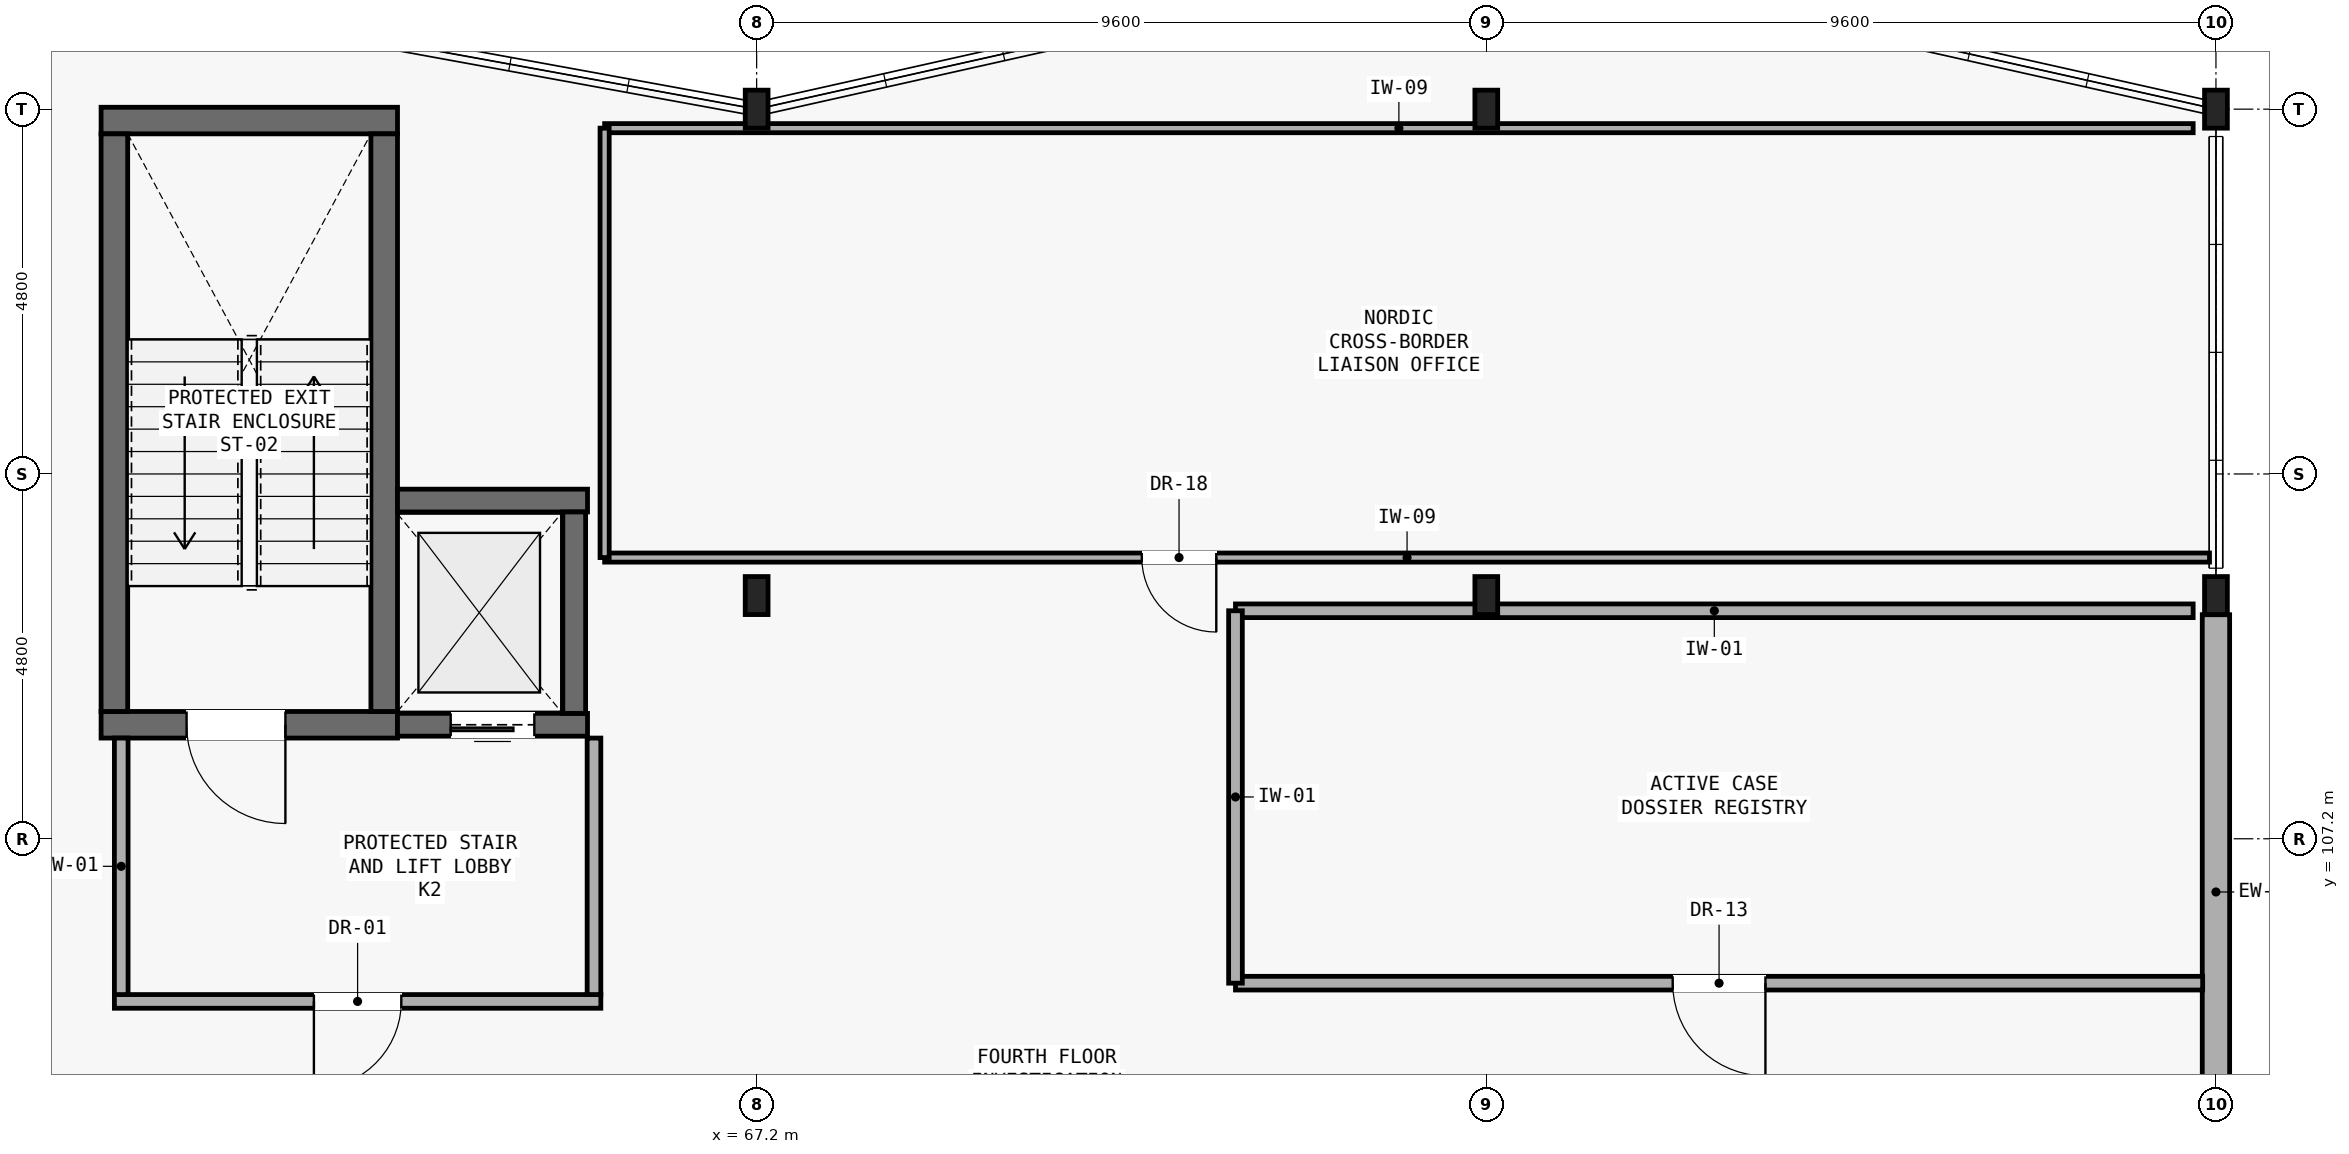
"""IFC4 building model, lengths in metres.
Left out: names, types, materials, properties, quantities, classifications, styles, units other than length and angle.
Written with IfcOpenShell. Run it as: python <this file> out.ifc"""

import sys

from ifc_helpers import new_model, si_unit, direction, frame, frame_2d, origin, origin_2d, place, context, subcontext, project, spatial, rectangle, i_section, extrude, element, fill, save


model = new_model("IFC4")
c1 = context("Model", 3, precision=1e-05, world=origin(), true_north=direction((0.0, 1.0)))
c2 = subcontext(c1, "Body", "Model", "MODEL_VIEW")
j1 = project(units=[si_unit("LENGTHUNIT", "METRE"), si_unit("PLANEANGLEUNIT", "RADIAN")], contexts=[c1])
p1 = place(None, origin())
s1 = spatial("IfcSite", under=j1, at=p1, CompositionType="ELEMENT")
p2 = place(p1, origin())
s2 = spatial("IfcBuilding", under=s1, at=p2, CompositionType="ELEMENT")
p3 = place(p2, frame((0.0, 0.0, 17.85)))
s3 = spatial("IfcBuildingStorey", under=s2, at=p3, CompositionType="ELEMENT", Elevation=17.85)
for number, where, z_axis, x_axis in (
    (1, (67.2, 110.4, 0.0), (0.0, 0.0, 1.0), (1.0, 0.0, 0.0)),
    (2, (67.2, 116.8, 0.0), (0.0, 0.0, 1.0), (1.0, 0.0, 0.0)),
    (3, (76.8, 110.4, 0.0), (0.0, 0.0, 1.0), (1.0, 0.0, 0.0)),
    (4, (76.8, 116.8, 0.0), (0.0, 0.0, 1.0), (1.0, 0.0, 0.0)),
    (5, (86.4, 110.4, 0.0), (0.0, 0.0, 1.0), (1.0, 0.0, 0.0)),
    (6, (86.4, 116.8, 0.0), (0.0, 0.0, 1.0), (1.0, 0.0, 0.0)),
):
    element("IfcColumn", number, at=place(p3, frame(where, z_axis=z_axis, x_axis=x_axis)), inside=s3, PredefinedType="COLUMN", context=c2, shape_type="SweptSolid", body=[
        extrude(i_section(OverallWidth=0.3, OverallDepth=0.5, WebThickness=0.014, FlangeThickness=0.028, FilletRadius=0.027, at=origin_2d()), origin(), (0.0, 0.0, 1.0), 4.2),
    ])
p4 = place(p3, frame((86.4, 102.852, 0.0), z_axis=(0.0, 0.0, 1.0), x_axis=(0.0, 1.0, 0.0)))
e7 = element("IfcWall", 7, at=p4, inside=s3, PredefinedType="SOLIDWALL", context=c2, shape_type="SweptSolid", body=[
    extrude(rectangle(XDim=7.296, YDim=0.36, at=frame_2d((3.648, 0.0))), origin(), (0.0, 0.0, 1.0), 3.53),
])
p5 = place(p3, frame((58.575, 108.7, 0.0), z_axis=(0.0, 0.0, 1.0), x_axis=(1.0, 0.0, 0.0)))
e8 = element("IfcWall", 8, at=p5, inside=s3, PredefinedType="SHEAR", context=c2, shape_type="SweptSolid", body=[
    extrude(rectangle(XDim=3.9, YDim=0.35, at=frame_2d((1.95, 0.0))), origin(), (0.0, 0.0, 1.0), 3.99),
])
p6 = place(p5, frame((1.125, 0.0, 0.0)))
e9 = element("IfcOpeningElement", 9, at=p6, cuts=e8, PredefinedType="OPENING", context=c2, shape_type="SweptSolid", body=[
    extrude(rectangle(XDim=1.3, YDim=2.15, at=frame_2d((0.65, 1.075))), frame((0.0, 0.185, 0.0), z_axis=(0.0, -1.0, 0.0), x_axis=(1.0, 0.0, 0.0)), (0.0, 0.0, 1.0), 0.37),
])
p7 = place(p3, frame((58.575, 116.65, 0.0), z_axis=(0.0, 0.0, 1.0), x_axis=(1.0, 0.0, 0.0)))
e10 = element("IfcWall", 10, at=p7, inside=s3, PredefinedType="SHEAR", context=c2, shape_type="SweptSolid", body=[
    extrude(rectangle(XDim=3.9, YDim=0.35, at=frame_2d((1.95, 0.0))), origin(), (0.0, 0.0, 1.0), 3.99),
])
for number, where, z_axis, x_axis in (
    (11, (58.75, 108.875, 0.0), (0.0, 0.0, 1.0), (0.0, 1.0, 0.0)),
    (12, (62.3, 108.875, 0.0), (0.0, 0.0, 1.0), (0.0, 1.0, 0.0)),
):
    element("IfcWall", number, at=place(p3, frame(where, z_axis=z_axis, x_axis=x_axis)), inside=s3, PredefinedType="SHEAR", context=c2, shape_type="SweptSolid", body=[
        extrude(rectangle(XDim=7.6, YDim=0.35, at=frame_2d((3.8, 0.0))), origin(), (0.0, 0.0, 1.0), 3.99),
    ])
p8 = place(p3, frame((62.475, 108.7, 0.0), z_axis=(0.0, 0.0, 1.0), x_axis=(1.0, 0.0, 0.0)))
e13 = element("IfcWall", 13, at=p8, inside=s3, PredefinedType="SHEAR", context=c2, shape_type="SweptSolid", body=[
    extrude(rectangle(XDim=2.5, YDim=0.3, at=frame_2d((1.25, 0.0))), origin(), (0.0, 0.0, 1.0), 3.99),
])
p9 = place(p8, frame((0.7, 0.0, 0.0)))
e14 = element("IfcOpeningElement", 14, at=p9, cuts=e13, PredefinedType="OPENING", context=c2, shape_type="SweptSolid", body=[
    extrude(rectangle(XDim=1.1, YDim=2.1, at=frame_2d((0.55, 1.05))), frame((0.0, 0.16, 0.0), z_axis=(0.0, -1.0, 0.0), x_axis=(1.0, 0.0, 0.0)), (0.0, 0.0, 1.0), 0.32),
])
p10 = place(p3, frame((62.475, 111.65, 0.0), z_axis=(0.0, 0.0, 1.0), x_axis=(1.0, 0.0, 0.0)))
e15 = element("IfcWall", 15, at=p10, inside=s3, PredefinedType="SHEAR", context=c2, shape_type="SweptSolid", body=[
    extrude(rectangle(XDim=2.5, YDim=0.3, at=frame_2d((1.25, 0.0))), origin(), (0.0, 0.0, 1.0), 3.99),
])
p11 = place(p3, frame((64.8, 108.85, 0.0), z_axis=(0.0, 0.0, 1.0), x_axis=(0.0, 1.0, 0.0)))
e16 = element("IfcWall", 16, at=p11, inside=s3, PredefinedType="SHEAR", context=c2, shape_type="SweptSolid", body=[
    extrude(rectangle(XDim=2.65, YDim=0.3, at=frame_2d((1.325, 0.0))), origin(), (0.0, 0.0, 1.0), 3.99),
])
p12 = place(p3, frame((58.75, 105.06, 0.0), z_axis=(0.0, 0.0, 1.0), x_axis=(1.0, 0.0, 0.0)))
e17 = element("IfcWall", 17, at=p12, inside=s3, PredefinedType="PARTITIONING", context=c2, shape_type="SweptSolid", body=[
    extrude(rectangle(XDim=6.4, YDim=0.18, at=frame_2d((3.2, 0.0))), origin(), (0.0, 0.0, 1.0), 3.61),
])
p13 = place(p12, frame((2.625, 0.0, 0.0)))
e18 = element("IfcOpeningElement", 18, at=p13, cuts=e17, PredefinedType="OPENING", context=c2, shape_type="SweptSolid", body=[
    extrude(rectangle(XDim=1.15, YDim=2.15, at=frame_2d((0.575, 1.075))), frame((0.0, 0.1, 0.0), z_axis=(0.0, -1.0, 0.0), x_axis=(1.0, 0.0, 0.0)), (0.0, 0.0, 1.0), 0.2),
])
for number, where, z_axis, x_axis in (
    (19, (58.84, 105.15, 0.0), (0.0, 0.0, 1.0), (0.0, 1.0, 0.0)),
    (20, (65.06, 105.15, 0.0), (0.0, 0.0, 1.0), (0.0, 1.0, 0.0)),
):
    element("IfcWall", number, at=place(p3, frame(where, z_axis=z_axis, x_axis=x_axis)), inside=s3, PredefinedType="PARTITIONING", context=c2, shape_type="SweptSolid", body=[
        extrude(rectangle(XDim=3.375, YDim=0.18, at=frame_2d((1.688, 0.0))), origin(), (0.0, 0.0, 1.0), 3.99),
    ])
p14 = place(p3, frame((65.2, 110.9, 0.0), z_axis=(0.0, 0.0, 1.0), x_axis=(1.0, 0.0, 0.0)))
e21 = element("IfcWall", 21, at=p14, inside=s3, PredefinedType="PARTITIONING", context=c2, shape_type="SweptSolid", body=[
    extrude(rectangle(XDim=21.115, YDim=0.12, at=frame_2d((10.558, 0.0))), origin(), (0.0, 0.0, 1.0), 3.99),
])
p15 = place(p14, frame((7.067, 0.0, 0.0)))
e22 = element("IfcOpeningElement", 22, at=p15, cuts=e21, PredefinedType="OPENING", context=c2, shape_type="SweptSolid", body=[
    extrude(rectangle(XDim=0.98, YDim=2.1, at=frame_2d((0.49, 1.05))), frame((0.0, 0.07, 0.0), z_axis=(0.0, -1.0, 0.0), x_axis=(1.0, 0.0, 0.0)), (0.0, 0.0, 1.0), 0.14),
])
p16 = place(p3, frame((86.1, 116.55, 0.0), z_axis=(0.0, 0.0, 1.0), x_axis=(-1.0, 0.0, 0.0)))
e23 = element("IfcWall", 23, at=p16, inside=s3, PredefinedType="PARTITIONING", context=c2, shape_type="SweptSolid", body=[
    extrude(rectangle(XDim=20.9, YDim=0.12, at=frame_2d((10.45, 0.0))), origin(), (0.0, 0.0, 1.0), 3.66),
])
p17 = place(p3, frame((65.2, 116.55, 0.0), z_axis=(0.0, 0.0, 1.0), x_axis=(0.0, -1.0, 0.0)))
e24 = element("IfcWall", 24, at=p17, inside=s3, PredefinedType="PARTITIONING", context=c2, shape_type="SweptSolid", body=[
    extrude(rectangle(XDim=5.65, YDim=0.12, at=frame_2d((2.825, 0.0))), origin(), (0.0, 0.0, 1.0), 3.99),
])
p18 = place(p3, frame((73.5, 105.3, 0.0), z_axis=(0.0, 0.0, 1.0), x_axis=(1.0, 0.0, 0.0)))
e25 = element("IfcWall", 25, at=p18, inside=s3, PredefinedType="PARTITIONING", context=c2, shape_type="SweptSolid", body=[
    extrude(rectangle(XDim=12.725, YDim=0.18, at=frame_2d((6.363, 0.0))), origin(), (0.0, 0.0, 1.0), 3.61),
])
p19 = place(p18, frame((5.752, 0.0, 0.0)))
e26 = element("IfcOpeningElement", 26, at=p19, cuts=e25, PredefinedType="OPENING", context=c2, shape_type="SweptSolid", body=[
    extrude(rectangle(XDim=1.22, YDim=2.1, at=frame_2d((0.61, 1.05))), frame((0.0, 0.1, 0.0), z_axis=(0.0, -1.0, 0.0), x_axis=(1.0, 0.0, 0.0)), (0.0, 0.0, 1.0), 0.2),
])
p20 = place(p3, frame((86.1, 110.2, 0.0), z_axis=(0.0, 0.0, 1.0), x_axis=(-1.0, 0.0, 0.0)))
e27 = element("IfcWall", 27, at=p20, inside=s3, PredefinedType="PARTITIONING", context=c2, shape_type="SweptSolid", body=[
    extrude(rectangle(XDim=12.6, YDim=0.18, at=frame_2d((6.3, 0.0))), origin(), (0.0, 0.0, 1.0), 3.43),
])
p21 = place(p3, frame((73.5, 110.2, 0.0), z_axis=(0.0, 0.0, 1.0), x_axis=(0.0, -1.0, 0.0)))
e28 = element("IfcWall", 28, at=p21, inside=s3, PredefinedType="PARTITIONING", context=c2, shape_type="SweptSolid", body=[
    extrude(rectangle(XDim=4.9, YDim=0.18, at=frame_2d((2.45, 0.0))), origin(), (0.0, 0.0, 1.0), 3.99),
])
p22 = place(p6, frame((1.3, 0.0, 0.0), z_axis=(0.0, 0.0, 1.0), x_axis=(-1.0, 0.0, 0.0)))
e29 = element("IfcDoor", 29, at=p22, inside=s3, OperationType="SINGLE_SWING_RIGHT", PredefinedType="DOOR", context=c2, shape_type="SweptSolid", body=[
    extrude(rectangle(XDim=1.3, YDim=2.15, at=frame_2d((0.65, 1.075))), frame((0.0, 0.025, 0.0), z_axis=(0.0, -1.0, 0.0), x_axis=(1.0, 0.0, 0.0)), (0.0, 0.0, 1.0), 0.05),
])
fill(e9, e29)
p23 = place(p9, frame((1.1, 0.0, 0.0), z_axis=(0.0, 0.0, 1.0), x_axis=(-1.0, 0.0, 0.0)))
e30 = element("IfcDoor", 30, at=p23, inside=s3, OperationType="SLIDING_TO_LEFT", PredefinedType="DOOR", context=c2, shape_type="SweptSolid", body=[
    extrude(rectangle(XDim=1.1, YDim=2.1, at=frame_2d((0.55, 1.05))), frame((0.0, 0.025, 0.0), z_axis=(0.0, -1.0, 0.0), x_axis=(1.0, 0.0, 0.0)), (0.0, 0.0, 1.0), 0.05),
])
fill(e14, e30)
p24 = place(p13, frame((1.15, 0.0, 0.0), z_axis=(0.0, 0.0, 1.0), x_axis=(-1.0, 0.0, 0.0)))
e31 = element("IfcDoor", 31, at=p24, inside=s3, OperationType="SINGLE_SWING_LEFT", PredefinedType="DOOR", context=c2, shape_type="SweptSolid", body=[
    extrude(rectangle(XDim=1.15, YDim=2.15, at=frame_2d((0.575, 1.075))), frame((0.0, 0.025, 0.0), z_axis=(0.0, -1.0, 0.0), x_axis=(1.0, 0.0, 0.0)), (0.0, 0.0, 1.0), 0.05),
])
fill(e18, e31)
p25 = place(p15, frame((0.98, 0.0, 0.0), z_axis=(0.0, 0.0, 1.0), x_axis=(-1.0, 0.0, 0.0)))
e32 = element("IfcDoor", 32, at=p25, inside=s3, OperationType="SINGLE_SWING_RIGHT", PredefinedType="DOOR", context=c2, shape_type="SweptSolid", body=[
    extrude(rectangle(XDim=0.98, YDim=2.1, at=frame_2d((0.49, 1.05))), frame((0.0, 0.025, 0.0), z_axis=(0.0, -1.0, 0.0), x_axis=(1.0, 0.0, 0.0)), (0.0, 0.0, 1.0), 0.05),
])
fill(e22, e32)
p26 = place(p19, frame((1.22, 0.0, 0.0), z_axis=(0.0, 0.0, 1.0), x_axis=(-1.0, 0.0, 0.0)))
e33 = element("IfcDoor", 33, at=p26, inside=s3, OperationType="SINGLE_SWING_RIGHT", PredefinedType="DOOR", context=c2, shape_type="SweptSolid", body=[
    extrude(rectangle(XDim=1.22, YDim=2.1, at=frame_2d((0.61, 1.05))), frame((0.0, 0.025, 0.0), z_axis=(0.0, -1.0, 0.0), x_axis=(1.0, 0.0, 0.0)), (0.0, 0.0, 1.0), 0.05),
])
fill(e26, e33)
save(model, sys.argv[1])
